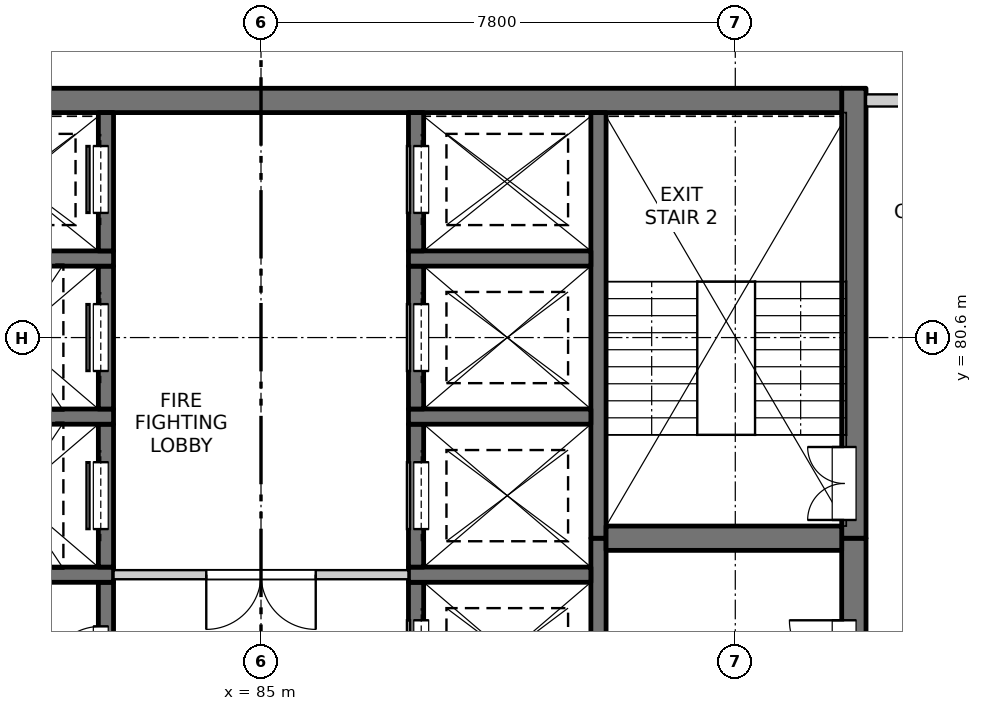
"""IFC4 building model, lengths in metres.
Left out: names, types, materials, properties, quantities, classifications, styles, units other than length and angle.
Written with IfcOpenShell. Run it as: python <this file> out.ifc"""

import sys

from ifc_helpers import new_model, si_unit, direction, frame, frame_2d, origin, place, context, subcontext, project, spatial, rectangle, extrude, element, fill, save


model = new_model("IFC4")
c1 = context("Model", 3, precision=1e-05, world=origin(), true_north=direction((0.0, 1.0)))
c2 = subcontext(c1, "Body", "Model", "MODEL_VIEW")
j1 = project(units=[si_unit("LENGTHUNIT", "METRE"), si_unit("PLANEANGLEUNIT", "RADIAN")], contexts=[c1])
p1 = place(None, origin())
s1 = spatial("IfcSite", under=j1, at=p1, CompositionType="ELEMENT")
p2 = place(p1, origin())
s2 = spatial("IfcBuilding", under=s1, at=p2, CompositionType="ELEMENT")
p3 = place(p2, frame((0.0, 0.0, 200.7)))
s3 = spatial("IfcBuildingStorey", under=s2, at=p3, CompositionType="ELEMENT", Elevation=200.7)
p4 = place(p3, frame((94.75, 61.95, -0.25), z_axis=(0.0, 0.0, 1.0), x_axis=(0.0, 1.0, 0.0)))
e1 = element("IfcWall", 1, at=p4, inside=s3, PredefinedType="SOLIDWALL", context=c2, shape_type="SweptSolid", body=[
    extrude(rectangle(XDim=15.35, YDim=0.4, at=frame_2d((7.675, 0.0))), origin(), (0.0, 0.0, 1.0), 3.4),
])
p5 = place(p4, frame((0.925, 0.0, 0.25)))
e2 = element("IfcOpeningElement", 2, at=p5, cuts=e1, PredefinedType="OPENING", context=c2, shape_type="SweptSolid", body=[
    extrude(rectangle(XDim=0.9, YDim=2.1, at=frame_2d((0.45, 1.05))), frame((0.0, 0.21, 0.0), z_axis=(0.0, -1.0, 0.0), x_axis=(1.0, 0.0, 0.0)), (0.0, 0.0, 1.0), 0.42),
])
p6 = place(p4, frame((5.15, 0.0, 0.25)))
e3 = element("IfcOpeningElement", 3, at=p6, cuts=e1, PredefinedType="OPENING", context=c2, shape_type="SweptSolid", body=[
    extrude(rectangle(XDim=0.9, YDim=2.1, at=frame_2d((0.45, 1.05))), frame((0.0, 0.21, 0.0), z_axis=(0.0, -1.0, 0.0), x_axis=(1.0, 0.0, 0.0)), (0.0, 0.0, 1.0), 0.42),
])
p7 = place(p4, frame((9.65, 0.0, 0.25)))
e4 = element("IfcOpeningElement", 4, at=p7, cuts=e1, PredefinedType="OPENING", context=c2, shape_type="SweptSolid", body=[
    extrude(rectangle(XDim=0.9, YDim=2.1, at=frame_2d((0.45, 1.05))), frame((0.0, 0.21, 0.0), z_axis=(0.0, -1.0, 0.0), x_axis=(1.0, 0.0, 0.0)), (0.0, 0.0, 1.0), 0.42),
])
p8 = place(p4, frame((13.1, 0.0, 0.25)))
e5 = element("IfcOpeningElement", 5, at=p8, cuts=e1, PredefinedType="OPENING", context=c2, shape_type="SweptSolid", body=[
    extrude(rectangle(XDim=0.9, YDim=2.1, at=frame_2d((0.45, 1.05))), frame((0.0, 0.21, 0.0), z_axis=(0.0, -1.0, 0.0), x_axis=(1.0, 0.0, 0.0)), (0.0, 0.0, 1.0), 0.42),
])
p9 = place(p3, frame((94.75, 77.3, -0.25), z_axis=(0.0, 0.0, 1.0), x_axis=(0.0, 1.0, 0.0)))
e6 = element("IfcWall", 6, at=p9, inside=s3, PredefinedType="SOLIDWALL", context=c2, shape_type="SweptSolid", body=[
    extrude(rectangle(XDim=7.4, YDim=0.4, at=frame_2d((3.7, 0.0))), origin(), (0.0, 0.0, 1.0), 3.4),
])
p10 = place(p9, frame((0.3, 0.0, 0.25)))
e7 = element("IfcOpeningElement", 7, at=p10, cuts=e6, PredefinedType="OPENING", context=c2, shape_type="SweptSolid", body=[
    extrude(rectangle(XDim=1.2, YDim=2.1, at=frame_2d((0.6, 1.05))), frame((0.0, 0.21, 0.0), z_axis=(0.0, -1.0, 0.0), x_axis=(1.0, 0.0, 0.0)), (0.0, 0.0, 1.0), 0.42),
])
p11 = place(p3, frame((75.45, 84.5, -0.25), z_axis=(0.0, 0.0, 1.0), x_axis=(1.0, 0.0, 0.0)))
e8 = element("IfcWall", 8, at=p11, inside=s3, PredefinedType="SOLIDWALL", context=c2, shape_type="SweptSolid", body=[
    extrude(rectangle(XDim=19.1, YDim=0.4, at=frame_2d((9.55, 0.0))), origin(), (0.0, 0.0, 1.0), 3.4),
])
p12 = place(p3, frame((90.55, 61.95, -0.25), z_axis=(0.0, 0.0, 1.0), x_axis=(0.0, 1.0, 0.0)))
e9 = element("IfcWall", 9, at=p12, inside=s3, PredefinedType="SOLIDWALL", context=c2, shape_type="SweptSolid", body=[
    extrude(rectangle(XDim=15.35, YDim=0.25, at=frame_2d((7.675, 0.0))), origin(), (0.0, 0.0, 1.0), 3.4),
])
p13 = place(p3, frame((90.55, 77.3, -0.25), z_axis=(0.0, 0.0, 1.0), x_axis=(0.0, 1.0, 0.0)))
e10 = element("IfcWall", 10, at=p13, inside=s3, PredefinedType="SOLIDWALL", context=c2, shape_type="SweptSolid", body=[
    extrude(rectangle(XDim=7.0, YDim=0.25, at=frame_2d((3.5, 0.0))), origin(), (0.0, 0.0, 1.0), 3.4),
])
p14 = place(p3, frame((82.45, 74.225, -0.25), z_axis=(0.0, 0.0, 1.0), x_axis=(0.0, 1.0, 0.0)))
e11 = element("IfcWall", 11, at=p14, inside=s3, PredefinedType="SOLIDWALL", context=c2, shape_type="SweptSolid", body=[
    extrude(rectangle(XDim=2.35, YDim=0.25, at=frame_2d((1.175, 0.0))), origin(), (0.0, 0.0, 1.0), 3.4),
])
p15 = place(p14, frame((0.725, 0.0, 0.25)))
e12 = element("IfcOpeningElement", 12, at=p15, cuts=e11, PredefinedType="OPENING", context=c2, shape_type="SweptSolid", body=[
    extrude(rectangle(XDim=0.9, YDim=2.1, at=frame_2d((0.45, 1.05))), frame((0.0, 0.135, 0.0), z_axis=(0.0, -1.0, 0.0), x_axis=(1.0, 0.0, 0.0)), (0.0, 0.0, 1.0), 0.27),
])
p16 = place(p3, frame((79.575, 76.7, -0.25), z_axis=(0.0, 0.0, 1.0), x_axis=(1.0, 0.0, 0.0)))
e13 = element("IfcWall", 13, at=p16, inside=s3, PredefinedType="SOLIDWALL", context=c2, shape_type="SweptSolid", body=[
    extrude(rectangle(XDim=3.0, YDim=0.25, at=frame_2d((1.5, 0.0))), origin(), (0.0, 0.0, 1.0), 3.4),
])
p17 = place(p3, frame((82.45, 76.825, -0.25), z_axis=(0.0, 0.0, 1.0), x_axis=(0.0, 1.0, 0.0)))
e14 = element("IfcWall", 14, at=p17, inside=s3, PredefinedType="SOLIDWALL", context=c2, shape_type="SweptSolid", body=[
    extrude(rectangle(XDim=2.35, YDim=0.25, at=frame_2d((1.175, 0.0))), origin(), (0.0, 0.0, 1.0), 3.4),
])
p18 = place(p17, frame((0.625, 0.0, 0.25)))
e15 = element("IfcOpeningElement", 15, at=p18, cuts=e14, PredefinedType="OPENING", context=c2, shape_type="SweptSolid", body=[
    extrude(rectangle(XDim=1.1, YDim=2.1, at=frame_2d((0.55, 1.05))), frame((0.0, 0.135, 0.0), z_axis=(0.0, -1.0, 0.0), x_axis=(1.0, 0.0, 0.0)), (0.0, 0.0, 1.0), 0.27),
])
p19 = place(p3, frame((79.575, 79.3, -0.25), z_axis=(0.0, 0.0, 1.0), x_axis=(1.0, 0.0, 0.0)))
e16 = element("IfcWall", 16, at=p19, inside=s3, PredefinedType="SOLIDWALL", context=c2, shape_type="SweptSolid", body=[
    extrude(rectangle(XDim=3.0, YDim=0.25, at=frame_2d((1.5, 0.0))), origin(), (0.0, 0.0, 1.0), 3.4),
])
p20 = place(p3, frame((82.45, 79.425, -0.25), z_axis=(0.0, 0.0, 1.0), x_axis=(0.0, 1.0, 0.0)))
e17 = element("IfcWall", 17, at=p20, inside=s3, PredefinedType="SOLIDWALL", context=c2, shape_type="SweptSolid", body=[
    extrude(rectangle(XDim=2.35, YDim=0.25, at=frame_2d((1.175, 0.0))), origin(), (0.0, 0.0, 1.0), 3.4),
])
p21 = place(p20, frame((0.625, 0.0, 0.25)))
e18 = element("IfcOpeningElement", 18, at=p21, cuts=e17, PredefinedType="OPENING", context=c2, shape_type="SweptSolid", body=[
    extrude(rectangle(XDim=1.1, YDim=2.1, at=frame_2d((0.55, 1.05))), frame((0.0, 0.135, 0.0), z_axis=(0.0, -1.0, 0.0), x_axis=(1.0, 0.0, 0.0)), (0.0, 0.0, 1.0), 0.27),
])
p22 = place(p3, frame((79.575, 81.9, -0.25), z_axis=(0.0, 0.0, 1.0), x_axis=(1.0, 0.0, 0.0)))
e19 = element("IfcWall", 19, at=p22, inside=s3, PredefinedType="SOLIDWALL", context=c2, shape_type="SweptSolid", body=[
    extrude(rectangle(XDim=3.0, YDim=0.25, at=frame_2d((1.5, 0.0))), origin(), (0.0, 0.0, 1.0), 3.4),
])
p23 = place(p3, frame((82.45, 82.025, -0.25), z_axis=(0.0, 0.0, 1.0), x_axis=(0.0, 1.0, 0.0)))
e20 = element("IfcWall", 20, at=p23, inside=s3, PredefinedType="SOLIDWALL", context=c2, shape_type="SweptSolid", body=[
    extrude(rectangle(XDim=2.275, YDim=0.25, at=frame_2d((1.138, 0.0))), origin(), (0.0, 0.0, 1.0), 3.4),
])
p24 = place(p23, frame((0.625, 0.0, 0.25)))
e21 = element("IfcOpeningElement", 21, at=p24, cuts=e20, PredefinedType="OPENING", context=c2, shape_type="SweptSolid", body=[
    extrude(rectangle(XDim=1.1, YDim=2.1, at=frame_2d((0.55, 1.05))), frame((0.0, 0.135, 0.0), z_axis=(0.0, -1.0, 0.0), x_axis=(1.0, 0.0, 0.0)), (0.0, 0.0, 1.0), 0.27),
])
p25 = place(p3, frame((87.55, 74.225, -0.25), z_axis=(0.0, 0.0, 1.0), x_axis=(0.0, 1.0, 0.0)))
e22 = element("IfcWall", 22, at=p25, inside=s3, PredefinedType="SOLIDWALL", context=c2, shape_type="SweptSolid", body=[
    extrude(rectangle(XDim=2.35, YDim=0.25, at=frame_2d((1.175, 0.0))), origin(), (0.0, 0.0, 1.0), 3.4),
])
p26 = place(p25, frame((0.625, 0.0, 0.25)))
e23 = element("IfcOpeningElement", 23, at=p26, cuts=e22, PredefinedType="OPENING", context=c2, shape_type="SweptSolid", body=[
    extrude(rectangle(XDim=1.1, YDim=2.1, at=frame_2d((0.55, 1.05))), frame((0.0, 0.135, 0.0), z_axis=(0.0, -1.0, 0.0), x_axis=(1.0, 0.0, 0.0)), (0.0, 0.0, 1.0), 0.27),
])
p27 = place(p3, frame((87.425, 76.7, -0.25), z_axis=(0.0, 0.0, 1.0), x_axis=(1.0, 0.0, 0.0)))
e24 = element("IfcWall", 24, at=p27, inside=s3, PredefinedType="SOLIDWALL", context=c2, shape_type="SweptSolid", body=[
    extrude(rectangle(XDim=3.0, YDim=0.25, at=frame_2d((1.5, 0.0))), origin(), (0.0, 0.0, 1.0), 3.4),
])
p28 = place(p3, frame((87.55, 76.825, -0.25), z_axis=(0.0, 0.0, 1.0), x_axis=(0.0, 1.0, 0.0)))
e25 = element("IfcWall", 25, at=p28, inside=s3, PredefinedType="SOLIDWALL", context=c2, shape_type="SweptSolid", body=[
    extrude(rectangle(XDim=2.35, YDim=0.25, at=frame_2d((1.175, 0.0))), origin(), (0.0, 0.0, 1.0), 3.4),
])
p29 = place(p28, frame((0.625, 0.0, 0.25)))
e26 = element("IfcOpeningElement", 26, at=p29, cuts=e25, PredefinedType="OPENING", context=c2, shape_type="SweptSolid", body=[
    extrude(rectangle(XDim=1.1, YDim=2.1, at=frame_2d((0.55, 1.05))), frame((0.0, 0.135, 0.0), z_axis=(0.0, -1.0, 0.0), x_axis=(1.0, 0.0, 0.0)), (0.0, 0.0, 1.0), 0.27),
])
p30 = place(p3, frame((87.425, 79.3, -0.25), z_axis=(0.0, 0.0, 1.0), x_axis=(1.0, 0.0, 0.0)))
e27 = element("IfcWall", 27, at=p30, inside=s3, PredefinedType="SOLIDWALL", context=c2, shape_type="SweptSolid", body=[
    extrude(rectangle(XDim=3.0, YDim=0.25, at=frame_2d((1.5, 0.0))), origin(), (0.0, 0.0, 1.0), 3.4),
])
p31 = place(p3, frame((87.55, 79.425, -0.25), z_axis=(0.0, 0.0, 1.0), x_axis=(0.0, 1.0, 0.0)))
e28 = element("IfcWall", 28, at=p31, inside=s3, PredefinedType="SOLIDWALL", context=c2, shape_type="SweptSolid", body=[
    extrude(rectangle(XDim=2.35, YDim=0.25, at=frame_2d((1.175, 0.0))), origin(), (0.0, 0.0, 1.0), 3.4),
])
p32 = place(p31, frame((0.625, 0.0, 0.25)))
e29 = element("IfcOpeningElement", 29, at=p32, cuts=e28, PredefinedType="OPENING", context=c2, shape_type="SweptSolid", body=[
    extrude(rectangle(XDim=1.1, YDim=2.1, at=frame_2d((0.55, 1.05))), frame((0.0, 0.135, 0.0), z_axis=(0.0, -1.0, 0.0), x_axis=(1.0, 0.0, 0.0)), (0.0, 0.0, 1.0), 0.27),
])
p33 = place(p3, frame((87.425, 81.9, -0.25), z_axis=(0.0, 0.0, 1.0), x_axis=(1.0, 0.0, 0.0)))
e30 = element("IfcWall", 30, at=p33, inside=s3, PredefinedType="SOLIDWALL", context=c2, shape_type="SweptSolid", body=[
    extrude(rectangle(XDim=3.0, YDim=0.25, at=frame_2d((1.5, 0.0))), origin(), (0.0, 0.0, 1.0), 3.4),
])
p34 = place(p3, frame((87.55, 82.025, -0.25), z_axis=(0.0, 0.0, 1.0), x_axis=(0.0, 1.0, 0.0)))
e31 = element("IfcWall", 31, at=p34, inside=s3, PredefinedType="SOLIDWALL", context=c2, shape_type="SweptSolid", body=[
    extrude(rectangle(XDim=2.275, YDim=0.25, at=frame_2d((1.138, 0.0))), origin(), (0.0, 0.0, 1.0), 3.4),
])
p35 = place(p34, frame((0.625, 0.0, 0.25)))
e32 = element("IfcOpeningElement", 32, at=p35, cuts=e31, PredefinedType="OPENING", context=c2, shape_type="SweptSolid", body=[
    extrude(rectangle(XDim=1.1, YDim=2.1, at=frame_2d((0.55, 1.05))), frame((0.0, 0.135, 0.0), z_axis=(0.0, -1.0, 0.0), x_axis=(1.0, 0.0, 0.0)), (0.0, 0.0, 1.0), 0.27),
])
p36 = place(p3, frame((90.675, 77.3, -0.25), z_axis=(0.0, 0.0, 1.0), x_axis=(1.0, 0.0, 0.0)))
e33 = element("IfcWall", 33, at=p36, inside=s3, PredefinedType="SOLIDWALL", context=c2, shape_type="SweptSolid", body=[
    extrude(rectangle(XDim=3.875, YDim=0.4, at=frame_2d((1.938, 0.0))), origin(), (0.0, 0.0, 1.0), 3.4),
])
p37 = place(p3, frame((82.575, 76.7, 0.0), z_axis=(0.0, 0.0, 1.0), x_axis=(1.0, 0.0, 0.0)))
e34 = element("IfcWall", 34, at=p37, inside=s3, PredefinedType="PARTITIONING", context=c2, shape_type="SweptSolid", body=[
    extrude(rectangle(XDim=4.85, YDim=0.15, at=frame_2d((2.425, 0.0))), origin(), (0.0, 0.0, 1.0), 3.15),
])
p38 = place(p37, frame((1.525, 0.0, 0.0)))
e35 = element("IfcOpeningElement", 35, at=p38, cuts=e34, PredefinedType="OPENING", context=c2, shape_type="SweptSolid", body=[
    extrude(rectangle(XDim=1.8, YDim=2.1, at=frame_2d((0.9, 1.05))), frame((0.0, 0.085, 0.0), z_axis=(0.0, -1.0, 0.0), x_axis=(1.0, 0.0, 0.0)), (0.0, 0.0, 1.0), 0.17),
])
p39 = place(p3, frame((94.95, 84.5, 0.0), z_axis=(0.0, 0.0, 1.0), x_axis=(1.0, 0.0, 0.0)))
e36 = element("IfcWall", 36, at=p39, inside=s3, PredefinedType="PARTITIONING", context=c2, shape_type="SweptSolid", body=[
    extrude(rectangle(XDim=1.85, YDim=0.2, at=frame_2d((0.925, 0.0))), origin(), (0.0, 0.0, 1.0), 3.15),
])
p40 = place(p15, origin())
e37 = element("IfcDoor", 37, at=p40, inside=s3, OperationType="SINGLE_SWING_LEFT", PredefinedType="DOOR", context=c2, shape_type="SweptSolid", body=[
    extrude(rectangle(XDim=0.9, YDim=2.1, at=frame_2d((0.45, 1.05))), frame((0.0, 0.11, 0.0), z_axis=(0.0, -1.0, 0.0), x_axis=(1.0, 0.0, 0.0)), (0.0, 0.0, 1.0), 0.05),
])
fill(e12, e37)
p41 = place(p26, origin())
e38 = element("IfcDoor", 38, at=p41, inside=s3, OperationType="SLIDING_TO_LEFT", PredefinedType="DOOR", context=c2, shape_type="SweptSolid", body=[
    extrude(rectangle(XDim=1.1, YDim=2.1, at=frame_2d((0.55, 1.05))), frame((0.0, -0.06, 0.0), z_axis=(0.0, -1.0, 0.0), x_axis=(1.0, 0.0, 0.0)), (0.0, 0.0, 1.0), 0.05),
])
fill(e23, e38)
p42 = place(p8, origin())
e39 = element("IfcDoor", 39, at=p42, inside=s3, OperationType="SINGLE_SWING_RIGHT", PredefinedType="DOOR", context=c2, shape_type="SweptSolid", body=[
    extrude(rectangle(XDim=0.9, YDim=2.1, at=frame_2d((0.45, 1.05))), frame((0.0, 0.185, 0.0), z_axis=(0.0, -1.0, 0.0), x_axis=(1.0, 0.0, 0.0)), (0.0, 0.0, 1.0), 0.05),
])
fill(e5, e39)
p43 = place(p38, origin())
e40 = element("IfcDoor", 40, at=p43, inside=s3, OperationType="DOUBLE_DOOR_SINGLE_SWING", PredefinedType="DOOR", context=c2, shape_type="SweptSolid", body=[
    extrude(rectangle(XDim=1.8, YDim=2.1, at=frame_2d((0.9, 1.05))), frame((0.0, 0.025, 0.0), z_axis=(0.0, -1.0, 0.0), x_axis=(1.0, 0.0, 0.0)), (0.0, 0.0, 1.0), 0.05),
])
fill(e35, e40)
p44 = place(p18, origin())
e41 = element("IfcDoor", 41, at=p44, inside=s3, OperationType="SLIDING_TO_LEFT", PredefinedType="DOOR", context=c2, shape_type="SweptSolid", body=[
    extrude(rectangle(XDim=1.1, YDim=2.1, at=frame_2d((0.55, 1.05))), frame((0.0, 0.11, 0.0), z_axis=(0.0, -1.0, 0.0), x_axis=(1.0, 0.0, 0.0)), (0.0, 0.0, 1.0), 0.05),
])
fill(e15, e41)
p45 = place(p29, origin())
e42 = element("IfcDoor", 42, at=p45, inside=s3, OperationType="SLIDING_TO_LEFT", PredefinedType="DOOR", context=c2, shape_type="SweptSolid", body=[
    extrude(rectangle(XDim=1.1, YDim=2.1, at=frame_2d((0.55, 1.05))), frame((0.0, -0.06, 0.0), z_axis=(0.0, -1.0, 0.0), x_axis=(1.0, 0.0, 0.0)), (0.0, 0.0, 1.0), 0.05),
])
fill(e26, e42)
p46 = place(p10, origin())
e43 = element("IfcDoor", 43, at=p46, inside=s3, OperationType="DOUBLE_DOOR_SINGLE_SWING", PredefinedType="DOOR", context=c2, shape_type="SweptSolid", body=[
    extrude(rectangle(XDim=1.2, YDim=2.1, at=frame_2d((0.6, 1.05))), frame((0.0, 0.185, 0.0), z_axis=(0.0, -1.0, 0.0), x_axis=(1.0, 0.0, 0.0)), (0.0, 0.0, 1.0), 0.05),
])
fill(e7, e43)
p47 = place(p21, origin())
e44 = element("IfcDoor", 44, at=p47, inside=s3, OperationType="SLIDING_TO_LEFT", PredefinedType="DOOR", context=c2, shape_type="SweptSolid", body=[
    extrude(rectangle(XDim=1.1, YDim=2.1, at=frame_2d((0.55, 1.05))), frame((0.0, 0.11, 0.0), z_axis=(0.0, -1.0, 0.0), x_axis=(1.0, 0.0, 0.0)), (0.0, 0.0, 1.0), 0.05),
])
fill(e18, e44)
p48 = place(p32, origin())
e45 = element("IfcDoor", 45, at=p48, inside=s3, OperationType="SLIDING_TO_RIGHT", PredefinedType="DOOR", context=c2, shape_type="SweptSolid", body=[
    extrude(rectangle(XDim=1.1, YDim=2.1, at=frame_2d((0.55, 1.05))), frame((0.0, -0.06, 0.0), z_axis=(0.0, -1.0, 0.0), x_axis=(1.0, 0.0, 0.0)), (0.0, 0.0, 1.0), 0.05),
])
fill(e29, e45)
p49 = place(p24, origin())
e46 = element("IfcDoor", 46, at=p49, inside=s3, OperationType="SLIDING_TO_RIGHT", PredefinedType="DOOR", context=c2, shape_type="SweptSolid", body=[
    extrude(rectangle(XDim=1.1, YDim=2.1, at=frame_2d((0.55, 1.05))), frame((0.0, 0.11, 0.0), z_axis=(0.0, -1.0, 0.0), x_axis=(1.0, 0.0, 0.0)), (0.0, 0.0, 1.0), 0.05),
])
fill(e21, e46)
p50 = place(p35, origin())
e47 = element("IfcDoor", 47, at=p50, inside=s3, OperationType="SLIDING_TO_RIGHT", PredefinedType="DOOR", context=c2, shape_type="SweptSolid", body=[
    extrude(rectangle(XDim=1.1, YDim=2.1, at=frame_2d((0.55, 1.05))), frame((0.0, -0.06, 0.0), z_axis=(0.0, -1.0, 0.0), x_axis=(1.0, 0.0, 0.0)), (0.0, 0.0, 1.0), 0.05),
])
fill(e32, e47)
save(model, sys.argv[1])
